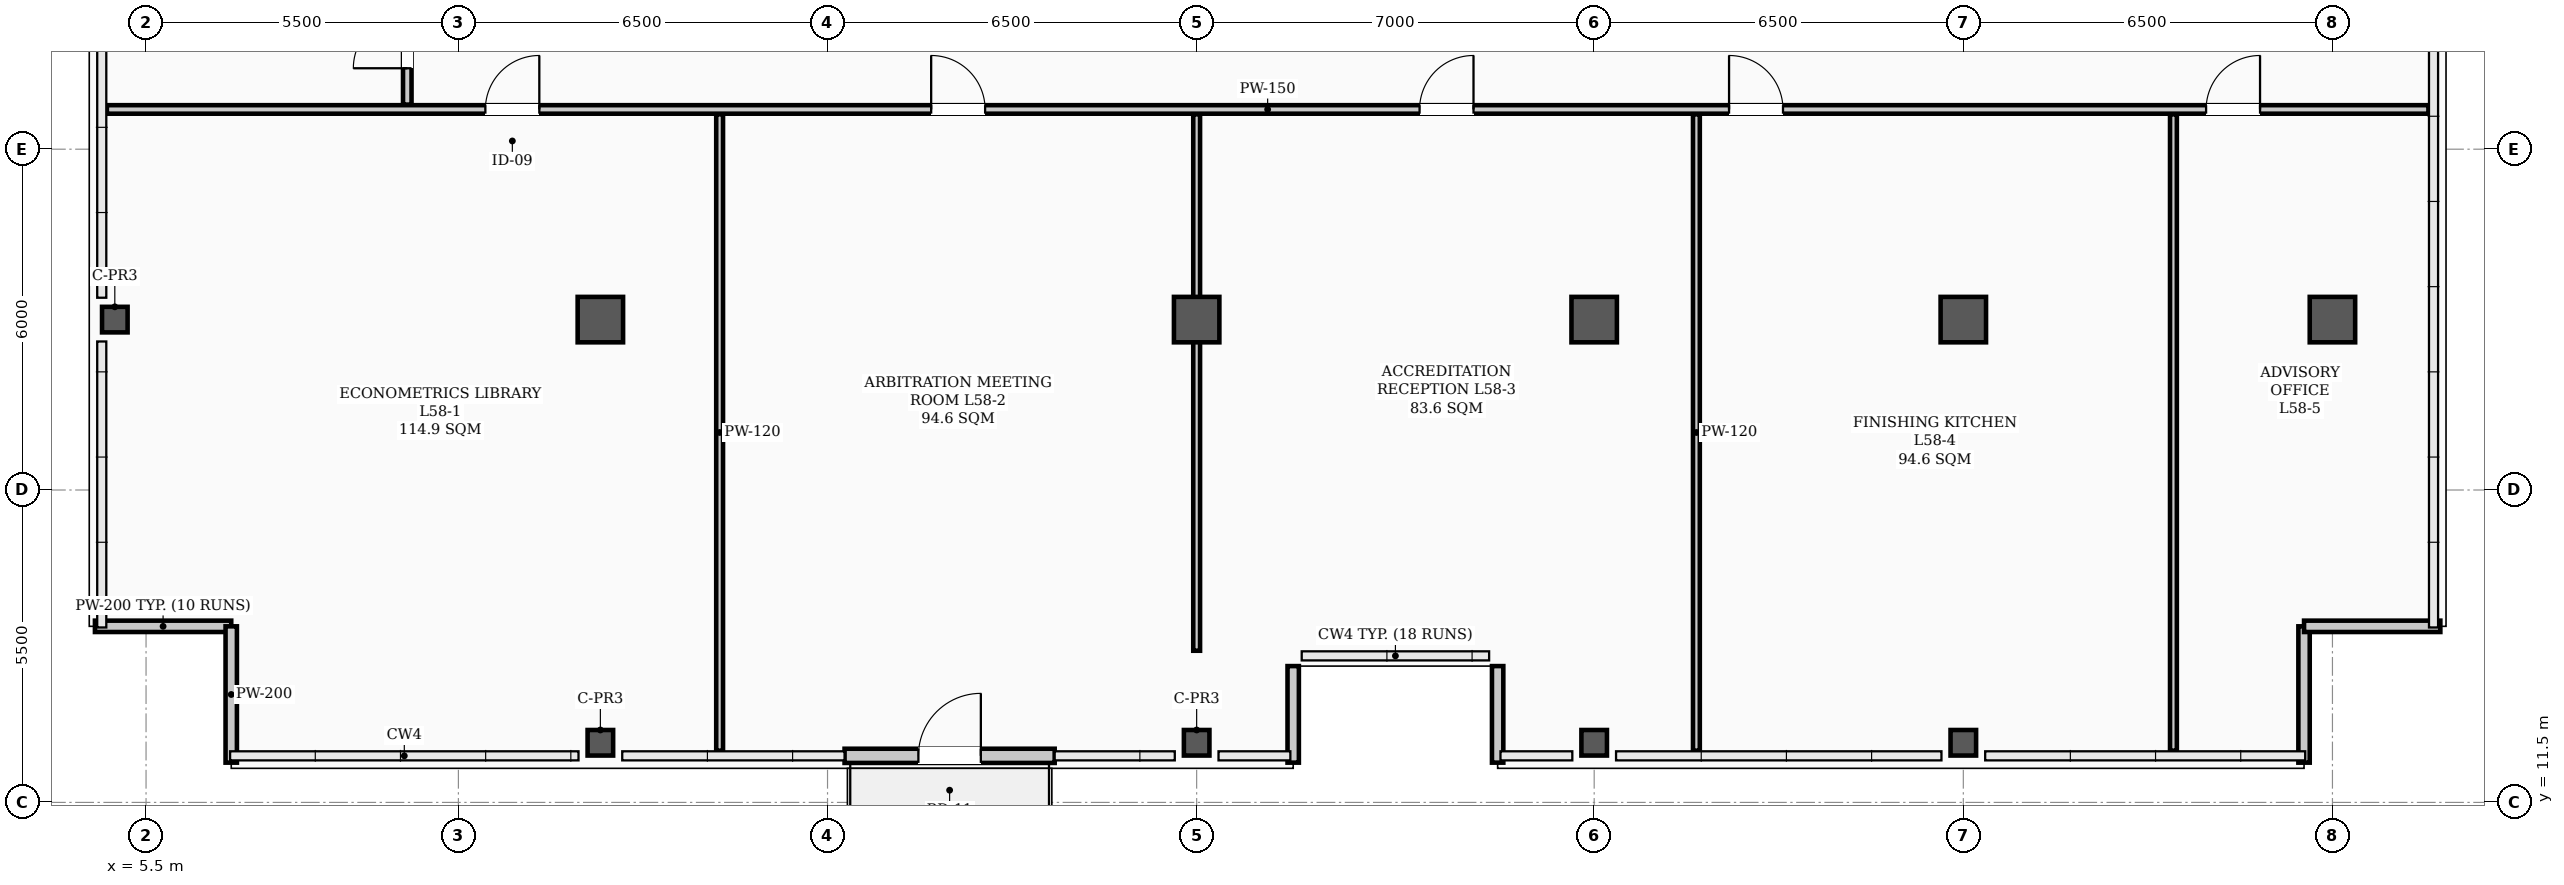
"""IFC4 building model, lengths in metres.
Left out: names, types, materials, properties, quantities, classifications, styles, units other than length and angle.
Written with IfcOpenShell. Run it as: python <this file> out.ifc"""

import sys

from ifc_helpers import new_model, si_unit, direction, frame, frame_2d, origin, origin_2d, place, context, subcontext, project, spatial, rectangle, hollow_rectangle, extrude, element, fill, save


model = new_model("IFC4")
c1 = context("Model", 3, precision=1e-05, world=origin(), true_north=direction((0.0, 1.0)))
c2 = subcontext(c1, "Body", "Model", "MODEL_VIEW")
j1 = project(units=[si_unit("LENGTHUNIT", "METRE"), si_unit("PLANEANGLEUNIT", "RADIAN")], contexts=[c1])
p1 = place(None, origin())
s1 = spatial("IfcSite", under=j1, at=p1, CompositionType="ELEMENT")
p2 = place(p1, origin())
s2 = spatial("IfcBuilding", under=s1, at=p2, CompositionType="ELEMENT")
p3 = place(p2, frame((0.0, 0.0, 234.5)))
s3 = spatial("IfcBuildingStorey", under=s2, at=p3, CompositionType="ELEMENT", Elevation=234.5)
for number, where, z_axis, x_axis in (
    (1, (13.5, 20.0, 0.0), (0.0, 0.0, 1.0), (1.0, 0.0, 0.0)),
    (2, (24.0, 20.0, 0.0), (0.0, 0.0, 1.0), (1.0, 0.0, 0.0)),
    (3, (31.0, 20.0, 0.0), (0.0, 0.0, 1.0), (1.0, 0.0, 0.0)),
    (4, (37.5, 20.0, 0.0), (0.0, 0.0, 1.0), (1.0, 0.0, 0.0)),
    (5, (44.0, 20.0, 0.0), (0.0, 0.0, 1.0), (1.0, 0.0, 0.0)),
):
    element("IfcColumn", number, at=place(p3, frame(where, z_axis=z_axis, x_axis=x_axis)), inside=s3, PredefinedType="COLUMN", context=c2, shape_type="SweptSolid", body=[
        extrude(hollow_rectangle(XDim=0.8, YDim=0.8, WallThickness=0.032, InnerFilletRadius=0.016, OuterFilletRadius=0.048, at=origin_2d()), origin(), (0.0, 0.0, 1.0), 3.9),
    ])
for number, where, z_axis, x_axis in (
    (6, (4.95, 20.0, 0.0), (0.0, 0.0, 1.0), (1.0, 0.0, 0.0)),
    (7, (13.5, 12.55, 0.0), (0.0, 0.0, 1.0), (1.0, 0.0, 0.0)),
    (8, (24.0, 12.55, 0.0), (0.0, 0.0, 1.0), (1.0, 0.0, 0.0)),
    (9, (31.0, 12.55, 0.0), (0.0, 0.0, 1.0), (1.0, 0.0, 0.0)),
    (10, (37.5, 12.55, 0.0), (0.0, 0.0, 1.0), (1.0, 0.0, 0.0)),
):
    element("IfcColumn", number, at=place(p3, frame(where, z_axis=z_axis, x_axis=x_axis)), inside=s3, PredefinedType="COLUMN", context=c2, shape_type="SweptSolid", body=[
        extrude(hollow_rectangle(XDim=0.45, YDim=0.45, WallThickness=0.022, InnerFilletRadius=0.022, OuterFilletRadius=0.044, at=origin_2d()), origin(), (0.0, 0.0, 1.0), 3.9),
    ])
p4 = place(p3, frame((4.6, 14.6, 0.0), z_axis=(0.0, 0.0, 1.0), x_axis=(1.0, 0.0, 0.0)))
e11 = element("IfcWall", 11, at=p4, inside=s3, PredefinedType="PARAPET", context=c2, shape_type="SweptSolid", body=[
    extrude(rectangle(XDim=2.4, YDim=0.2, at=frame_2d((1.2, 0.0))), origin(), (0.0, 0.0, 1.0), 1.2),
])
for number, where, z_axis, x_axis in (
    (12, (7.0, 14.6, 0.0), (0.0, 0.0, 1.0), (0.0, -1.0, 0.0)),
    (13, (43.5, 12.2, 0.0), (0.0, 0.0, 1.0), (0.0, 1.0, 0.0)),
):
    element("IfcWall", number, at=place(p3, frame(where, z_axis=z_axis, x_axis=x_axis)), inside=s3, PredefinedType="PARAPET", context=c2, shape_type="SweptSolid", body=[
        extrude(rectangle(XDim=2.4, YDim=0.2, at=frame_2d((1.2, 0.0))), origin(), (0.0, 0.0, 1.0), 1.2),
    ])
p5 = place(p3, frame((43.5, 14.6, 0.0), z_axis=(0.0, 0.0, 1.0), x_axis=(1.0, 0.0, 0.0)))
e14 = element("IfcWall", 14, at=p5, inside=s3, PredefinedType="PARAPET", context=c2, shape_type="SweptSolid", body=[
    extrude(rectangle(XDim=2.4, YDim=0.2, at=frame_2d((1.2, 0.0))), origin(), (0.0, 0.0, 1.0), 1.2),
])
for number, where, z_axis, x_axis in (
    (15, (25.7, 12.2, 0.0), (0.0, 0.0, 1.0), (0.0, 1.0, 0.0)),
    (16, (29.3, 13.9, 0.0), (0.0, 0.0, 1.0), (0.0, -1.0, 0.0)),
):
    element("IfcWall", number, at=place(p3, frame(where, z_axis=z_axis, x_axis=x_axis)), inside=s3, PredefinedType="PARAPET", context=c2, shape_type="SweptSolid", body=[
        extrude(rectangle(XDim=1.7, YDim=0.2, at=frame_2d((0.85, 0.0))), origin(), (0.0, 0.0, 1.0), 1.2),
    ])
p6 = place(p3, frame((17.8, 12.32, 0.0), z_axis=(0.0, 0.0, 1.0), x_axis=(1.0, 0.0, 0.0)))
e17 = element("IfcWall", 17, at=p6, inside=s3, PredefinedType="STANDARD", context=c2, shape_type="SweptSolid", body=[
    extrude(rectangle(XDim=3.7, YDim=0.25, at=frame_2d((1.85, 0.0))), origin(), (0.0, 0.0, 1.0), 3.18),
])
p7 = place(p6, frame((1.3, 0.0, 0.0)))
e18 = element("IfcOpeningElement", 18, at=p7, cuts=e17, PredefinedType="OPENING", context=c2, shape_type="SweptSolid", body=[
    extrude(rectangle(XDim=1.1, YDim=2.2, at=frame_2d((0.55, 1.1))), frame((0.0, 0.135, 0.0), z_axis=(0.0, -1.0, 0.0), x_axis=(1.0, 0.0, 0.0)), (0.0, 0.0, 1.0), 0.27),
])
p8 = place(p3, frame((4.81, 23.7, 0.0), z_axis=(0.0, 0.0, 1.0), x_axis=(1.0, 0.0, 0.0)))
e19 = element("IfcWall", 19, at=p8, inside=s3, PredefinedType="PARTITIONING", context=c2, shape_type="SweptSolid", body=[
    extrude(rectangle(XDim=40.88, YDim=0.15, at=frame_2d((20.44, 0.0))), origin(), (0.0, 0.0, 1.0), 3.2),
])
p9 = place(p8, frame((6.665, 0.0, 0.0)))
e20 = element("IfcOpeningElement", 20, at=p9, cuts=e19, PredefinedType="OPENING", context=c2, shape_type="SweptSolid", body=[
    extrude(rectangle(XDim=0.95, YDim=2.08, at=frame_2d((0.475, 1.04))), frame((0.0, 0.085, 0.0), z_axis=(0.0, -1.0, 0.0), x_axis=(1.0, 0.0, 0.0)), (0.0, 0.0, 1.0), 0.17),
])
p10 = place(p8, frame((14.515, 0.0, 0.0)))
e21 = element("IfcOpeningElement", 21, at=p10, cuts=e19, PredefinedType="OPENING", context=c2, shape_type="SweptSolid", body=[
    extrude(rectangle(XDim=0.95, YDim=2.08, at=frame_2d((0.475, 1.04))), frame((0.0, 0.085, 0.0), z_axis=(0.0, -1.0, 0.0), x_axis=(1.0, 0.0, 0.0)), (0.0, 0.0, 1.0), 0.17),
])
p11 = place(p8, frame((23.115, 0.0, 0.0)))
e22 = element("IfcOpeningElement", 22, at=p11, cuts=e19, PredefinedType="OPENING", context=c2, shape_type="SweptSolid", body=[
    extrude(rectangle(XDim=0.95, YDim=2.08, at=frame_2d((0.475, 1.04))), frame((0.0, 0.085, 0.0), z_axis=(0.0, -1.0, 0.0), x_axis=(1.0, 0.0, 0.0)), (0.0, 0.0, 1.0), 0.17),
])
p12 = place(p8, frame((28.565, 0.0, 0.0)))
e23 = element("IfcOpeningElement", 23, at=p12, cuts=e19, PredefinedType="OPENING", context=c2, shape_type="SweptSolid", body=[
    extrude(rectangle(XDim=0.95, YDim=2.08, at=frame_2d((0.475, 1.04))), frame((0.0, 0.085, 0.0), z_axis=(0.0, -1.0, 0.0), x_axis=(1.0, 0.0, 0.0)), (0.0, 0.0, 1.0), 0.17),
])
p13 = place(p8, frame((36.965, 0.0, 0.0)))
e24 = element("IfcOpeningElement", 24, at=p13, cuts=e19, PredefinedType="OPENING", context=c2, shape_type="SweptSolid", body=[
    extrude(rectangle(XDim=0.95, YDim=2.08, at=frame_2d((0.475, 1.04))), frame((0.0, 0.085, 0.0), z_axis=(0.0, -1.0, 0.0), x_axis=(1.0, 0.0, 0.0)), (0.0, 0.0, 1.0), 0.17),
])
p14 = place(p3, frame((10.1, 23.785, 0.0), z_axis=(0.0, 0.0, 1.0), x_axis=(0.0, 1.0, 0.0)))
e25 = element("IfcWall", 25, at=p14, inside=s3, PredefinedType="PARTITIONING", context=c2, shape_type="SweptSolid", body=[
    extrude(rectangle(XDim=12.28, YDim=0.15, at=frame_2d((6.14, 0.0))), origin(), (0.0, 0.0, 1.0), 3.1),
])
p15 = place(p14, frame((0.64, 0.0, 0.0)))
e26 = element("IfcOpeningElement", 26, at=p15, cuts=e25, PredefinedType="OPENING", context=c2, shape_type="SweptSolid", body=[
    extrude(rectangle(XDim=0.95, YDim=2.08, at=frame_2d((0.475, 1.04))), frame((0.0, 0.085, 0.0), z_axis=(0.0, -1.0, 0.0), x_axis=(1.0, 0.0, 0.0)), (0.0, 0.0, 1.0), 0.17),
])
p16 = place(p14, frame((9.815, 0.0, 0.0)))
e27 = element("IfcOpeningElement", 27, at=p16, cuts=e25, PredefinedType="OPENING", context=c2, shape_type="SweptSolid", body=[
    extrude(rectangle(XDim=0.95, YDim=2.08, at=frame_2d((0.475, 1.04))), frame((0.0, 0.085, 0.0), z_axis=(0.0, -1.0, 0.0), x_axis=(1.0, 0.0, 0.0)), (0.0, 0.0, 1.0), 0.17),
])
p17 = place(p3, frame((15.6, 12.41, 0.0), z_axis=(0.0, 0.0, 1.0), x_axis=(0.0, 1.0, 0.0)))
e28 = element("IfcWall", 28, at=p17, inside=s3, PredefinedType="PARTITIONING", context=c2, shape_type="SweptSolid", body=[
    extrude(rectangle(XDim=11.205, YDim=0.12, at=frame_2d((5.603, 0.0))), origin(), (0.0, 0.0, 1.0), 3.1),
])
p18 = place(p3, frame((24.0, 14.17, 0.0), z_axis=(0.0, 0.0, 1.0), x_axis=(0.0, 1.0, 0.0)))
e29 = element("IfcWall", 29, at=p18, inside=s3, PredefinedType="PARTITIONING", context=c2, shape_type="SweptSolid", body=[
    extrude(rectangle(XDim=9.445, YDim=0.12, at=frame_2d((4.723, 0.0))), origin(), (0.0, 0.0, 1.0), 3.1),
])
p19 = place(p3, frame((32.8, 12.41, 0.0), z_axis=(0.0, 0.0, 1.0), x_axis=(0.0, 1.0, 0.0)))
e30 = element("IfcWall", 30, at=p19, inside=s3, PredefinedType="PARTITIONING", context=c2, shape_type="SweptSolid", body=[
    extrude(rectangle(XDim=11.205, YDim=0.12, at=frame_2d((5.603, 0.0))), origin(), (0.0, 0.0, 1.0), 3.1),
])
p20 = place(p3, frame((41.2, 12.41, 0.0), z_axis=(0.0, 0.0, 1.0), x_axis=(0.0, 1.0, 0.0)))
e31 = element("IfcWall", 31, at=p20, inside=s3, PredefinedType="PARTITIONING", context=c2, shape_type="SweptSolid", body=[
    extrude(rectangle(XDim=11.205, YDim=0.12, at=frame_2d((5.603, 0.0))), origin(), (0.0, 0.0, 1.0), 3.72),
])
p21 = place(p7, origin())
e32 = element("IfcDoor", 32, at=p21, inside=s3, OperationType="SINGLE_SWING_RIGHT", PredefinedType="DOOR", context=c2, shape_type="SweptSolid", body=[
    extrude(rectangle(XDim=1.1, YDim=2.2, at=frame_2d((0.55, 1.1))), frame((0.0, 0.025, 0.0), z_axis=(0.0, -1.0, 0.0), x_axis=(1.0, 0.0, 0.0)), (0.0, 0.0, 1.0), 0.05),
])
fill(e18, e32)
p22 = place(p9, origin())
e33 = element("IfcDoor", 33, at=p22, inside=s3, OperationType="SINGLE_SWING_RIGHT", PredefinedType="DOOR", context=c2, shape_type="SweptSolid", body=[
    extrude(rectangle(XDim=0.95, YDim=2.08, at=frame_2d((0.475, 1.04))), frame((0.0, 0.025, 0.0), z_axis=(0.0, -1.0, 0.0), x_axis=(1.0, 0.0, 0.0)), (0.0, 0.0, 1.0), 0.05),
])
fill(e20, e33)
p23 = place(p10, origin())
e34 = element("IfcDoor", 34, at=p23, inside=s3, OperationType="SINGLE_SWING_LEFT", PredefinedType="DOOR", context=c2, shape_type="SweptSolid", body=[
    extrude(rectangle(XDim=0.95, YDim=2.08, at=frame_2d((0.475, 1.04))), frame((0.0, 0.025, 0.0), z_axis=(0.0, -1.0, 0.0), x_axis=(1.0, 0.0, 0.0)), (0.0, 0.0, 1.0), 0.05),
])
fill(e21, e34)
p24 = place(p11, origin())
e35 = element("IfcDoor", 35, at=p24, inside=s3, OperationType="SINGLE_SWING_RIGHT", PredefinedType="DOOR", context=c2, shape_type="SweptSolid", body=[
    extrude(rectangle(XDim=0.95, YDim=2.08, at=frame_2d((0.475, 1.04))), frame((0.0, 0.025, 0.0), z_axis=(0.0, -1.0, 0.0), x_axis=(1.0, 0.0, 0.0)), (0.0, 0.0, 1.0), 0.05),
])
fill(e22, e35)
p25 = place(p12, origin())
e36 = element("IfcDoor", 36, at=p25, inside=s3, OperationType="SINGLE_SWING_LEFT", PredefinedType="DOOR", context=c2, shape_type="SweptSolid", body=[
    extrude(rectangle(XDim=0.95, YDim=2.08, at=frame_2d((0.475, 1.04))), frame((0.0, 0.025, 0.0), z_axis=(0.0, -1.0, 0.0), x_axis=(1.0, 0.0, 0.0)), (0.0, 0.0, 1.0), 0.05),
])
fill(e23, e36)
p26 = place(p13, origin())
e37 = element("IfcDoor", 37, at=p26, inside=s3, OperationType="SINGLE_SWING_RIGHT", PredefinedType="DOOR", context=c2, shape_type="SweptSolid", body=[
    extrude(rectangle(XDim=0.95, YDim=2.08, at=frame_2d((0.475, 1.04))), frame((0.0, 0.025, 0.0), z_axis=(0.0, -1.0, 0.0), x_axis=(1.0, 0.0, 0.0)), (0.0, 0.0, 1.0), 0.05),
])
fill(e24, e37)
p27 = place(p15, origin())
e38 = element("IfcDoor", 38, at=p27, inside=s3, OperationType="SINGLE_SWING_LEFT", PredefinedType="DOOR", context=c2, shape_type="SweptSolid", body=[
    extrude(rectangle(XDim=0.95, YDim=2.08, at=frame_2d((0.475, 1.04))), frame((0.0, 0.025, 0.0), z_axis=(0.0, -1.0, 0.0), x_axis=(1.0, 0.0, 0.0)), (0.0, 0.0, 1.0), 0.05),
])
fill(e26, e38)
save(model, sys.argv[1])
